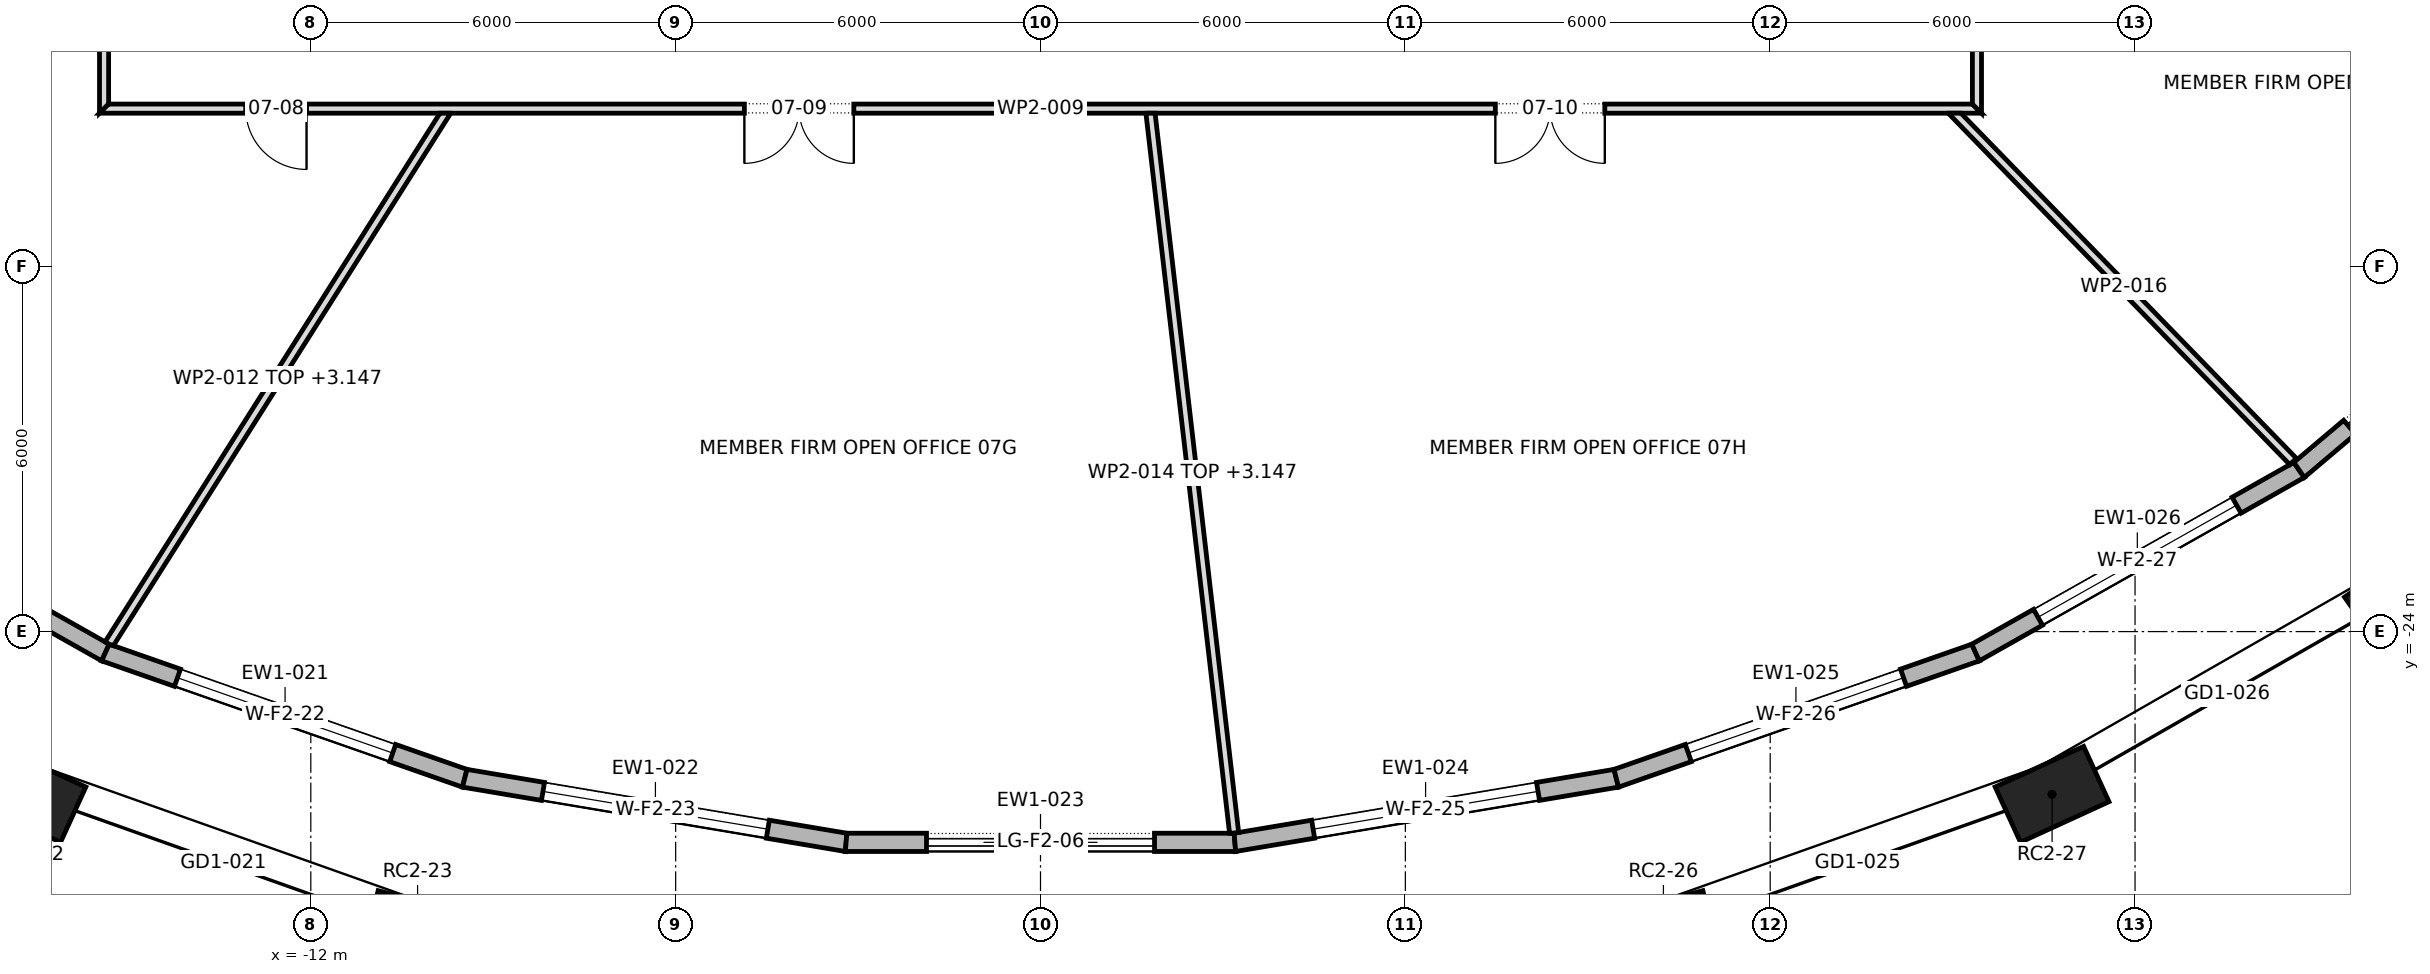
"""IFC4 building model, lengths in metres.
Left out: names, types, materials, properties, quantities, classifications, styles, units other than length and angle.
Written with IfcOpenShell. Run it as: python <this file> out.ifc"""

import sys

from ifc_helpers import new_model, si_unit, direction, frame, frame_2d, origin, origin_2d, place, context, subcontext, project, spatial, polyline, rectangle, outline, extrude, element, fill, save


model = new_model("IFC4")
c1 = context("Model", 3, precision=1e-05, world=origin(), true_north=direction((0.0, 1.0)))
c2 = subcontext(c1, "Body", "Model", "MODEL_VIEW")
j1 = project(units=[si_unit("LENGTHUNIT", "METRE"), si_unit("PLANEANGLEUNIT", "RADIAN")], contexts=[c1])
p1 = place(None, origin())
s1 = spatial("IfcSite", under=j1, at=p1, CompositionType="ELEMENT")
p2 = place(p1, origin())
s2 = spatial("IfcBuilding", under=s1, at=p2, CompositionType="ELEMENT")
p3 = place(p2, frame((0.0, 0.0, 104.5)))
s3 = spatial("IfcBuildingStorey", under=s2, at=p3, CompositionType="ELEMENT", Elevation=104.5)
for number, where, z_axis, x_axis in (
    (1, (-16.635, -26.677, 0.0), (0.0, 0.0, 1.0), (0.909, -0.417, 0.0)),
    (2, (-10.244, -28.946, 0.0), (0.0, 0.0, 1.0), (0.968, -0.252, 0.0)),
    (3, (10.244, -28.946, 0.0), (0.0, 0.0, 1.0), (0.968, 0.252, 0.0)),
    (4, (16.635, -26.677, 0.0), (0.0, 0.0, 1.0), (0.909, 0.417, 0.0)),
    (5, (22.387, -23.382, 0.0), (0.0, 0.0, 1.0), (0.818, 0.575, 0.0)),
):
    element("IfcColumn", number, at=place(p3, frame(where, z_axis=z_axis, x_axis=x_axis)), inside=s3, PredefinedType="COLUMN", context=c2, shape_type="SweptSolid", body=[
        extrude(rectangle(XDim=1.6, YDim=1.0, at=origin_2d()), origin(), (0.0, 0.0, 1.0), 4.2),
    ])
p4 = place(p3, frame((-20.697, -21.341, 0.0), z_axis=(0.0, 0.0, 1.0), x_axis=(0.870828448417, -0.491587035455, 0.0)))
e6 = element("IfcWall", 6, at=p4, inside=s3, PredefinedType="STANDARD", context=c2, shape_type="SweptSolid", body=[
    extrude(outline(polyline([(-0.014, -0.15), (6.122, -0.15), (6.095, 0.15), (0.014, 0.15), (-0.014, -0.15)])), origin(), (0.0, 0.0, 1.0), 3.9),
])
p5 = place(p4, frame((1.179, 0.0, 0.6)))
e7 = element("IfcOpeningElement", 7, at=p5, cuts=e6, PredefinedType="OPENING", context=c2, shape_type="SweptSolid", body=[
    extrude(rectangle(XDim=3.75, YDim=2.85, at=frame_2d((1.875, 1.425))), frame((0.0, 0.162, 0.0), z_axis=(0.0, -1.0, 0.0), x_axis=(1.0, 0.0, 0.0)), (0.0, 0.0, 1.0), 0.324),
])
p6 = place(p3, frame((-15.377, -24.344, 0.0), z_axis=(0.0, 0.0, 1.0), x_axis=(0.943866868202, -0.330326104193, 0.0)))
e8 = element("IfcWall", 8, at=p6, inside=s3, PredefinedType="STANDARD", context=c2, shape_type="SweptSolid", body=[
    extrude(outline(polyline([(-0.013, -0.15), (6.273, -0.15), (6.247, 0.15), (0.013, 0.15), (-0.013, -0.15)])), origin(), (0.0, 0.0, 1.0), 3.9),
])
p7 = place(p6, frame((1.255, 0.0, 0.6)))
e9 = element("IfcOpeningElement", 9, at=p7, cuts=e8, PredefinedType="OPENING", context=c2, shape_type="SweptSolid", body=[
    extrude(rectangle(XDim=3.75, YDim=2.85, at=frame_2d((1.875, 1.425))), frame((0.0, 0.162, 0.0), z_axis=(0.0, -1.0, 0.0), x_axis=(1.0, 0.0, 0.0)), (0.0, 0.0, 1.0), 0.324),
])
p8 = place(p3, frame((-9.469, -26.412, 0.0), z_axis=(0.0, 0.0, 1.0), x_axis=(0.986178310488, -0.165687476666, 0.0)))
e10 = element("IfcWall", 10, at=p8, inside=s3, PredefinedType="STANDARD", context=c2, shape_type="SweptSolid", body=[
    extrude(outline(polyline([(-0.013, -0.15), (6.372, -0.15), (6.347, 0.15), (0.013, 0.15), (-0.013, -0.15)])), origin(), (0.0, 0.0, 1.0), 3.9),
])
p9 = place(p8, frame((1.305, 0.0, 0.6)))
e11 = element("IfcOpeningElement", 11, at=p9, cuts=e10, PredefinedType="OPENING", context=c2, shape_type="SweptSolid", body=[
    extrude(rectangle(XDim=3.75, YDim=2.85, at=frame_2d((1.875, 1.425))), frame((0.0, 0.162, 0.0), z_axis=(0.0, -1.0, 0.0), x_axis=(1.0, 0.0, 0.0)), (0.0, 0.0, 1.0), 0.324),
])
p10 = place(p3, frame((-3.197, -27.466, 0.0), z_axis=(0.0, 0.0, 1.0), x_axis=(1.0, 0.0, 0.0)))
e12 = element("IfcWall", 12, at=p10, inside=s3, PredefinedType="STANDARD", context=c2, shape_type="SweptSolid", body=[
    extrude(outline(polyline([(-0.012, -0.15), (6.406, -0.15), (6.382, 0.15), (0.012, 0.15), (-0.012, -0.15)])), origin(), (0.0, 0.0, 1.0), 3.9),
])
p11 = place(p10, frame((1.322, 0.0, 0.0)))
e13 = element("IfcOpeningElement", 13, at=p11, cuts=e12, PredefinedType="OPENING", context=c2, shape_type="SweptSolid", body=[
    extrude(rectangle(XDim=3.75, YDim=3.45, at=frame_2d((1.875, 1.725))), frame((0.0, 0.162, 0.0), z_axis=(0.0, -1.0, 0.0), x_axis=(1.0, 0.0, 0.0)), (0.0, 0.0, 1.0), 0.324),
])
p12 = place(p3, frame((3.197, -27.466, 0.0), z_axis=(0.0, 0.0, 1.0), x_axis=(0.986178310488, 0.165687476666, 0.0)))
e14 = element("IfcWall", 14, at=p12, inside=s3, PredefinedType="STANDARD", context=c2, shape_type="SweptSolid", body=[
    extrude(outline(polyline([(-0.012, -0.15), (6.372, -0.15), (6.347, 0.15), (0.012, 0.15), (-0.012, -0.15)])), origin(), (0.0, 0.0, 1.0), 3.9),
])
p13 = place(p12, frame((1.305, 0.0, 0.6)))
e15 = element("IfcOpeningElement", 15, at=p13, cuts=e14, PredefinedType="OPENING", context=c2, shape_type="SweptSolid", body=[
    extrude(rectangle(XDim=3.75, YDim=2.85, at=frame_2d((1.875, 1.425))), frame((0.0, 0.162, 0.0), z_axis=(0.0, -1.0, 0.0), x_axis=(1.0, 0.0, 0.0)), (0.0, 0.0, 1.0), 0.324),
])
p14 = place(p3, frame((9.469, -26.412, 0.0), z_axis=(0.0, 0.0, 1.0), x_axis=(0.943866868202, 0.330326104193, 0.0)))
e16 = element("IfcWall", 16, at=p14, inside=s3, PredefinedType="STANDARD", context=c2, shape_type="SweptSolid", body=[
    extrude(outline(polyline([(-0.013, -0.15), (6.273, -0.15), (6.247, 0.15), (0.013, 0.15), (-0.013, -0.15)])), origin(), (0.0, 0.0, 1.0), 3.9),
])
p15 = place(p14, frame((1.255, 0.0, 0.6)))
e17 = element("IfcOpeningElement", 17, at=p15, cuts=e16, PredefinedType="OPENING", context=c2, shape_type="SweptSolid", body=[
    extrude(rectangle(XDim=3.75, YDim=2.85, at=frame_2d((1.875, 1.425))), frame((0.0, 0.162, 0.0), z_axis=(0.0, -1.0, 0.0), x_axis=(1.0, 0.0, 0.0)), (0.0, 0.0, 1.0), 0.324),
])
p16 = place(p3, frame((15.377, -24.344, 0.0), z_axis=(0.0, 0.0, 1.0), x_axis=(0.870828448417, 0.491587035455, 0.0)))
e18 = element("IfcWall", 18, at=p16, inside=s3, PredefinedType="STANDARD", context=c2, shape_type="SweptSolid", body=[
    extrude(outline(polyline([(-0.013, -0.15), (6.123, -0.15), (6.094, 0.15), (0.013, 0.15), (-0.013, -0.15)])), origin(), (0.0, 0.0, 1.0), 3.9),
])
p17 = place(p16, frame((1.179, 0.0, 0.6)))
e19 = element("IfcOpeningElement", 19, at=p17, cuts=e18, PredefinedType="OPENING", context=c2, shape_type="SweptSolid", body=[
    extrude(rectangle(XDim=3.75, YDim=2.85, at=frame_2d((1.875, 1.425))), frame((0.0, 0.162, 0.0), z_axis=(0.0, -1.0, 0.0), x_axis=(1.0, 0.0, 0.0)), (0.0, 0.0, 1.0), 0.324),
])
p18 = place(p3, frame((20.697, -21.341, 0.0), z_axis=(0.0, 0.0, 1.0), x_axis=(0.763894031266, 0.645341699409, 0.0)))
e20 = element("IfcWall", 20, at=p18, inside=s3, PredefinedType="STANDARD", context=c2, shape_type="SweptSolid", body=[
    extrude(outline(polyline([(-0.014, -0.15), (5.94, -0.15), (5.91, 0.15), (0.014, 0.15), (-0.014, -0.15)])), origin(), (0.0, 0.0, 1.0), 3.9),
])
p19 = place(p18, frame((1.087, 0.0, 0.0)))
e21 = element("IfcOpeningElement", 21, at=p19, cuts=e20, PredefinedType="OPENING", context=c2, shape_type="SweptSolid", body=[
    extrude(rectangle(XDim=3.75, YDim=3.45, at=frame_2d((1.875, 1.725))), frame((0.0, 0.162, 0.0), z_axis=(0.0, -1.0, 0.0), x_axis=(1.0, 0.0, 0.0)), (0.0, 0.0, 1.0), 0.324),
])
p20 = place(p3, frame((-25.12, -17.414, 0.0), z_axis=(0.0, 0.0, 1.0), x_axis=(0.822008683907, 0.569474954306, 0.0)))
e22 = element("IfcWall", 22, at=p20, inside=s3, PredefinedType="PARTITIONING", context=c2, shape_type="SweptSolid", body=[
    extrude(outline(polyline([(0.024, -0.075), (1.967, -0.075), (3.91, -0.075), (5.853, -0.075), (7.796, -0.075), (9.739, -0.075), (11.681, -0.075), (11.734, 0.002), (11.734, 0.002), (11.785, 0.074), (11.785, 0.075), (10.15, 0.075), (8.516, 0.075), (6.881, 0.075), (5.246, 0.075), (5.245, 0.072), (5.241, 0.075), (3.494, 0.075), (1.747, 0.075), (0.0, 0.075), (0.0, 0.07), (0.005, -0.002), (0.024, -0.075)])), origin(), (0.0, 0.0, 1.0), 3.13),
])
p21 = place(p3, frame((-15.4, -15.475, 0.0), z_axis=(0.0, 0.0, 1.0), x_axis=(0.0, 1.0, 0.0)))
e23 = element("IfcWall", 23, at=p21, inside=s3, PredefinedType="PARTITIONING", context=c2, shape_type="SweptSolid", body=[
    extrude(outline(polyline([(0.15, -0.075), (2.066, -0.075), (3.981, -0.075), (5.897, -0.075), (7.812, -0.075), (9.728, -0.075), (11.644, -0.075), (13.56, -0.075), (15.475, -0.075), (17.391, -0.075), (19.306, -0.075), (21.222, -0.075), (23.138, -0.075), (25.053, -0.075), (26.969, -0.075), (28.885, -0.075), (30.8, -0.075), (30.95, 0.075), (29.016, 0.075), (27.081, 0.075), (25.147, 0.075), (23.212, 0.075), (21.278, 0.075), (19.344, 0.075), (17.409, 0.075), (15.475, 0.075), (13.541, 0.075), (11.606, 0.075), (9.672, 0.075), (7.738, 0.075), (5.803, 0.075), (3.869, 0.075), (1.935, 0.075), (0.0, 0.075), (0.15, -0.075)])), origin(), (0.0, 0.0, 1.0), 3.9),
])
p22 = place(p21, frame((24.25, 0.0, 0.0)))
e24 = element("IfcOpeningElement", 24, at=p22, cuts=e23, PredefinedType="OPENING", context=c2, shape_type="SweptSolid", body=[
    extrude(rectangle(XDim=1.8, YDim=2.1, at=frame_2d((0.9, 1.05))), frame((0.0, 0.087, 0.0), z_axis=(0.0, -1.0, 0.0), x_axis=(1.0, 0.0, 0.0)), (0.0, 0.0, 1.0), 0.174),
])
p23 = place(p21, frame((6.735, 0.0, 0.0)))
e25 = element("IfcOpeningElement", 25, at=p23, cuts=e23, PredefinedType="OPENING", context=c2, shape_type="SweptSolid", body=[
    extrude(rectangle(XDim=1.0, YDim=2.1, at=frame_2d((0.5, 1.05))), frame((0.0, 0.087, 0.0), z_axis=(0.0, -1.0, 0.0), x_axis=(1.0, 0.0, 0.0)), (0.0, 0.0, 1.0), 0.174),
])
p24 = place(p21, frame((12.5, 0.0, 0.0)))
e26 = element("IfcOpeningElement", 26, at=p24, cuts=e23, PredefinedType="OPENING", context=c2, shape_type="SweptSolid", body=[
    extrude(rectangle(XDim=1.0, YDim=2.1, at=frame_2d((0.5, 1.05))), frame((0.0, 0.087, 0.0), z_axis=(0.0, -1.0, 0.0), x_axis=(1.0, 0.0, 0.0)), (0.0, 0.0, 1.0), 0.174),
])
p25 = place(p21, frame((17.375, 0.0, 0.0)))
e27 = element("IfcOpeningElement", 27, at=p25, cuts=e23, PredefinedType="OPENING", context=c2, shape_type="SweptSolid", body=[
    extrude(rectangle(XDim=1.0, YDim=2.1, at=frame_2d((0.5, 1.05))), frame((0.0, 0.087, 0.0), z_axis=(0.0, -1.0, 0.0), x_axis=(1.0, 0.0, 0.0)), (0.0, 0.0, 1.0), 0.174),
])
p26 = place(p3, frame((-15.475, -15.4, 0.0), z_axis=(0.0, 0.0, 1.0), x_axis=(1.0, 0.0, 0.0)))
e28 = element("IfcWall", 28, at=p26, inside=s3, PredefinedType="PARTITIONING", context=c2, shape_type="SweptSolid", body=[
    extrude(outline(polyline([(0.0, -0.075), (1.935, -0.075), (3.869, -0.075), (5.803, -0.075), (7.738, -0.075), (9.672, -0.075), (11.606, -0.075), (13.541, -0.075), (15.475, -0.075), (17.409, -0.075), (19.344, -0.075), (21.278, -0.075), (23.212, -0.075), (25.147, -0.075), (27.081, -0.075), (29.016, -0.075), (30.95, -0.075), (30.8, 0.075), (28.885, 0.075), (26.969, 0.075), (25.053, 0.075), (23.138, 0.075), (21.222, 0.075), (19.306, 0.075), (17.391, 0.075), (15.475, 0.075), (13.56, 0.075), (11.644, 0.075), (9.728, 0.075), (7.812, 0.075), (5.897, 0.075), (3.981, 0.075), (2.066, 0.075), (0.15, 0.075), (0.0, -0.075)])), origin(), (0.0, 0.0, 1.0), 3.9),
])
p27 = place(p26, frame((2.405, 0.0, 0.0)))
e29 = element("IfcOpeningElement", 29, at=p27, cuts=e28, PredefinedType="OPENING", context=c2, shape_type="SweptSolid", body=[
    extrude(rectangle(XDim=1.0, YDim=2.1, at=frame_2d((0.5, 1.05))), frame((0.0, 0.087, 0.0), z_axis=(0.0, -1.0, 0.0), x_axis=(1.0, 0.0, 0.0)), (0.0, 0.0, 1.0), 0.174),
])
p28 = place(p26, frame((10.605, 0.0, 0.0)))
e30 = element("IfcOpeningElement", 30, at=p28, cuts=e28, PredefinedType="OPENING", context=c2, shape_type="SweptSolid", body=[
    extrude(rectangle(XDim=1.8, YDim=2.1, at=frame_2d((0.9, 1.05))), frame((0.0, 0.087, 0.0), z_axis=(0.0, -1.0, 0.0), x_axis=(1.0, 0.0, 0.0)), (0.0, 0.0, 1.0), 0.174),
])
p29 = place(p26, frame((22.955, 0.0, 0.0)))
e31 = element("IfcOpeningElement", 31, at=p29, cuts=e28, PredefinedType="OPENING", context=c2, shape_type="SweptSolid", body=[
    extrude(rectangle(XDim=1.8, YDim=2.1, at=frame_2d((0.9, 1.05))), frame((0.0, 0.087, 0.0), z_axis=(0.0, -1.0, 0.0), x_axis=(1.0, 0.0, 0.0)), (0.0, 0.0, 1.0), 0.174),
])
p30 = place(p3, frame((-9.762, -15.435, 0.0), z_axis=(0.0, 0.0, 1.0), x_axis=(-0.535189090909, -0.844732287161, 0.0)))
e32 = element("IfcWall", 32, at=p30, inside=s3, PredefinedType="PARTITIONING", context=c2, shape_type="SweptSolid", body=[
    extrude(outline(polyline([(10.386, -0.075), (10.386, -0.069), (10.382, 0.004), (10.365, 0.075), (8.638, 0.075), (6.91, 0.075), (5.183, 0.075), (3.455, 0.075), (1.728, 0.075), (0.0, 0.075), (0.0, 0.075), (0.095, -0.075), (1.81, -0.075), (3.525, -0.075), (5.24, -0.075), (6.955, -0.075), (8.671, -0.075), (10.386, -0.075)])), origin(), (0.0, 0.0, 1.0), 3.147),
])
p31 = place(p3, frame((1.808, -15.467, 0.0), z_axis=(0.0, 0.0, 1.0), x_axis=(0.115425226741, -0.993316171736, 0.0)))
e33 = element("IfcWall", 33, at=p31, inside=s3, PredefinedType="PARTITIONING", context=c2, shape_type="SweptSolid", body=[
    extrude(outline(polyline([(0.0, -0.075), (1.987, -0.075), (3.973, -0.075), (5.96, -0.075), (7.947, -0.075), (9.934, -0.075), (11.92, -0.075), (11.925, -0.035), (11.925, 0.075), (9.94, 0.075), (7.956, 0.075), (5.971, 0.075), (3.987, 0.075), (2.002, 0.075), (0.017, 0.075), (0.0, -0.073), (0.0, -0.075)])), origin(), (0.0, 0.0, 1.0), 3.147),
])
p32 = place(p3, frame((14.982, -15.423, 0.0), z_axis=(0.0, 0.0, 1.0), x_axis=(0.696915710248, -0.717153046992, 0.0)))
e34 = element("IfcWall", 34, at=p32, inside=s3, PredefinedType="PARTITIONING", context=c2, shape_type="SweptSolid", body=[
    extrude(outline(polyline([(8.059, 0.075), (6.08, 0.075), (4.102, 0.075), (2.124, 0.075), (0.146, 0.075), (0.0, -0.075), (0.0, -0.075), (1.612, -0.075), (3.223, -0.075), (4.835, -0.075), (6.447, -0.075), (8.059, -0.075), (8.059, 0.075)])), origin(), (0.0, 0.0, 1.0), 3.9),
])
p33 = place(p3, frame((15.4, -15.475, 0.0), z_axis=(0.0, 0.0, 1.0), x_axis=(0.0, 1.0, 0.0)))
e35 = element("IfcWall", 35, at=p33, inside=s3, PredefinedType="PARTITIONING", context=c2, shape_type="SweptSolid", body=[
    extrude(outline(polyline([(14.195, 0.075), (12.439, 0.075), (10.684, 0.075), (8.928, 0.075), (7.173, 0.075), (5.417, 0.075), (3.661, 0.075), (1.906, 0.075), (0.15, 0.075), (0.0, -0.075), (1.775, -0.075), (3.549, -0.075), (5.323, -0.075), (7.098, -0.075), (8.872, -0.075), (10.646, -0.075), (12.421, -0.075), (14.195, -0.075), (14.195, 0.075)])), origin(), (0.0, 0.0, 1.0), 3.9),
])
p34 = place(p33, frame((3.8, 0.0, 0.0)))
e36 = element("IfcOpeningElement", 36, at=p34, cuts=e35, PredefinedType="OPENING", context=c2, shape_type="SweptSolid", body=[
    extrude(rectangle(XDim=1.0, YDim=2.1, at=frame_2d((0.5, 1.05))), frame((0.0, 0.087, 0.0), z_axis=(0.0, -1.0, 0.0), x_axis=(1.0, 0.0, 0.0)), (0.0, 0.0, 1.0), 0.174),
])
p35 = place(p33, frame((10.86, 0.0, 0.0)))
e37 = element("IfcOpeningElement", 37, at=p35, cuts=e35, PredefinedType="OPENING", context=c2, shape_type="SweptSolid", body=[
    extrude(rectangle(XDim=1.0, YDim=2.1, at=frame_2d((0.5, 1.05))), frame((0.0, 0.087, 0.0), z_axis=(0.0, -1.0, 0.0), x_axis=(1.0, 0.0, 0.0)), (0.0, 0.0, 1.0), 0.174),
])
p36 = place(p7, origin())
e38 = element("IfcWindow", 38, at=p36, inside=s3, PartitioningType="TRIPLE_PANEL_VERTICAL", PredefinedType="WINDOW", context=c2, shape_type="SweptSolid", body=[
    extrude(rectangle(XDim=3.75, YDim=2.85, at=frame_2d((1.875, 1.425))), frame((0.0, 0.03, 0.0), z_axis=(0.0, -1.0, 0.0), x_axis=(1.0, 0.0, 0.0)), (0.0, 0.0, 1.0), 0.06),
])
fill(e9, e38)
p37 = place(p9, origin())
e39 = element("IfcWindow", 39, at=p37, inside=s3, PartitioningType="TRIPLE_PANEL_VERTICAL", PredefinedType="WINDOW", context=c2, shape_type="SweptSolid", body=[
    extrude(rectangle(XDim=3.75, YDim=2.85, at=frame_2d((1.875, 1.425))), frame((0.0, 0.03, 0.0), z_axis=(0.0, -1.0, 0.0), x_axis=(1.0, 0.0, 0.0)), (0.0, 0.0, 1.0), 0.06),
])
fill(e11, e39)
p38 = place(p11, origin())
e40 = element("IfcDoor", 40, at=p38, inside=s3, OperationType="DOUBLE_DOOR_SLIDING", PredefinedType="DOOR", context=c2, shape_type="SweptSolid", body=[
    extrude(rectangle(XDim=3.75, YDim=3.45, at=frame_2d((1.875, 1.725))), frame((0.0, 0.025, 0.0), z_axis=(0.0, -1.0, 0.0), x_axis=(1.0, 0.0, 0.0)), (0.0, 0.0, 1.0), 0.05),
])
fill(e13, e40)
p39 = place(p13, origin())
e41 = element("IfcWindow", 41, at=p39, inside=s3, PartitioningType="TRIPLE_PANEL_VERTICAL", PredefinedType="WINDOW", context=c2, shape_type="SweptSolid", body=[
    extrude(rectangle(XDim=3.75, YDim=2.85, at=frame_2d((1.875, 1.425))), frame((0.0, 0.03, 0.0), z_axis=(0.0, -1.0, 0.0), x_axis=(1.0, 0.0, 0.0)), (0.0, 0.0, 1.0), 0.06),
])
fill(e15, e41)
p40 = place(p15, origin())
e42 = element("IfcWindow", 42, at=p40, inside=s3, PartitioningType="TRIPLE_PANEL_VERTICAL", PredefinedType="WINDOW", context=c2, shape_type="SweptSolid", body=[
    extrude(rectangle(XDim=3.75, YDim=2.85, at=frame_2d((1.875, 1.425))), frame((0.0, 0.03, 0.0), z_axis=(0.0, -1.0, 0.0), x_axis=(1.0, 0.0, 0.0)), (0.0, 0.0, 1.0), 0.06),
])
fill(e17, e42)
p41 = place(p17, origin())
e43 = element("IfcWindow", 43, at=p41, inside=s3, PartitioningType="TRIPLE_PANEL_VERTICAL", PredefinedType="WINDOW", context=c2, shape_type="SweptSolid", body=[
    extrude(rectangle(XDim=3.75, YDim=2.85, at=frame_2d((1.875, 1.425))), frame((0.0, 0.03, 0.0), z_axis=(0.0, -1.0, 0.0), x_axis=(1.0, 0.0, 0.0)), (0.0, 0.0, 1.0), 0.06),
])
fill(e19, e43)
p42 = place(p19, origin())
e44 = element("IfcDoor", 44, at=p42, inside=s3, OperationType="DOUBLE_DOOR_SLIDING", PredefinedType="DOOR", context=c2, shape_type="SweptSolid", body=[
    extrude(rectangle(XDim=3.75, YDim=3.45, at=frame_2d((1.875, 1.725))), frame((0.0, 0.025, 0.0), z_axis=(0.0, -1.0, 0.0), x_axis=(1.0, 0.0, 0.0)), (0.0, 0.0, 1.0), 0.05),
])
fill(e21, e44)
p43 = place(p27, frame((1.0, 0.0, 0.0), z_axis=(0.0, 0.0, 1.0), x_axis=(-1.0, 0.0, 0.0)))
e45 = element("IfcDoor", 45, at=p43, inside=s3, OperationType="SINGLE_SWING_RIGHT", PredefinedType="DOOR", context=c2, shape_type="SweptSolid", body=[
    extrude(rectangle(XDim=1.0, YDim=2.1, at=frame_2d((0.5, 1.05))), frame((0.0, 0.025, 0.0), z_axis=(0.0, -1.0, 0.0), x_axis=(1.0, 0.0, 0.0)), (0.0, 0.0, 1.0), 0.05),
])
fill(e29, e45)
p44 = place(p28, frame((1.8, 0.0, 0.0), z_axis=(0.0, 0.0, 1.0), x_axis=(-1.0, 0.0, 0.0)))
e46 = element("IfcDoor", 46, at=p44, inside=s3, OperationType="DOUBLE_DOOR_SINGLE_SWING", PredefinedType="DOOR", context=c2, shape_type="SweptSolid", body=[
    extrude(rectangle(XDim=1.8, YDim=2.1, at=frame_2d((0.9, 1.05))), frame((0.0, 0.025, 0.0), z_axis=(0.0, -1.0, 0.0), x_axis=(1.0, 0.0, 0.0)), (0.0, 0.0, 1.0), 0.05),
])
fill(e30, e46)
p45 = place(p29, frame((1.8, 0.0, 0.0), z_axis=(0.0, 0.0, 1.0), x_axis=(-1.0, 0.0, 0.0)))
e47 = element("IfcDoor", 47, at=p45, inside=s3, OperationType="DOUBLE_DOOR_SINGLE_SWING", PredefinedType="DOOR", context=c2, shape_type="SweptSolid", body=[
    extrude(rectangle(XDim=1.8, YDim=2.1, at=frame_2d((0.9, 1.05))), frame((0.0, 0.025, 0.0), z_axis=(0.0, -1.0, 0.0), x_axis=(1.0, 0.0, 0.0)), (0.0, 0.0, 1.0), 0.05),
])
fill(e31, e47)
save(model, sys.argv[1])
